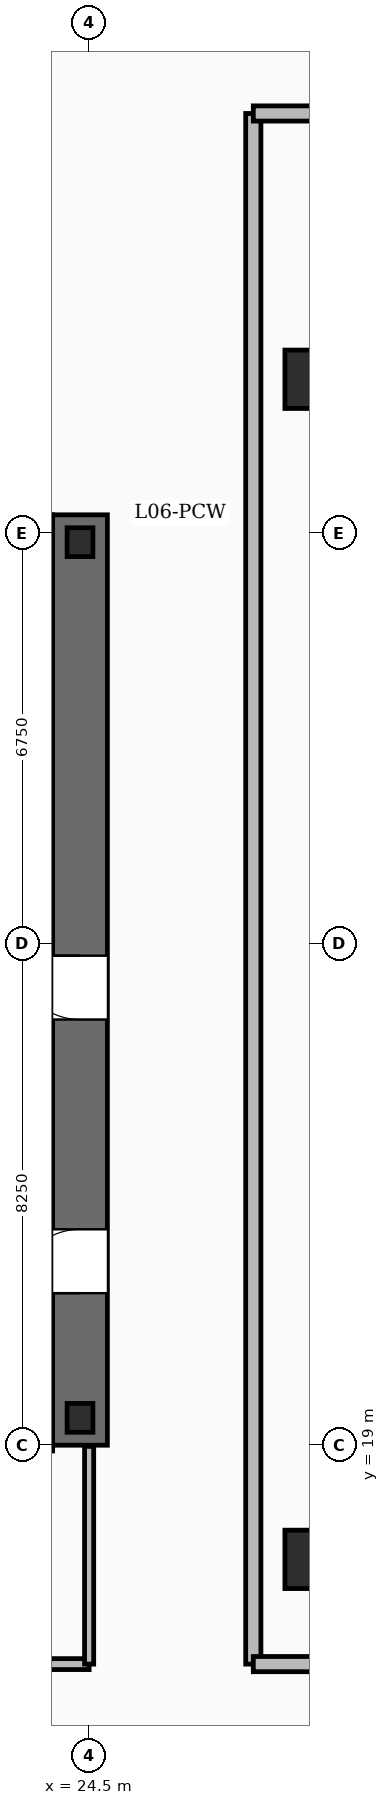
"""IFC4 building model, lengths in metres.
Left out: names, types, materials, properties, quantities, classifications, styles, units other than length and angle.
Written with IfcOpenShell. Run it as: python <this file> out.ifc"""

import sys

from ifc_helpers import new_model, si_unit, direction, frame, frame_2d, origin, origin_2d, place, context, subcontext, project, spatial, rectangle, circle, i_section, extrude, element, fill, save


model = new_model("IFC4")
c1 = context("Model", 3, precision=1e-05, world=origin(), true_north=direction((0.0, 1.0)))
c2 = subcontext(c1, "Body", "Model", "MODEL_VIEW")
j1 = project(units=[si_unit("LENGTHUNIT", "METRE"), si_unit("PLANEANGLEUNIT", "RADIAN")], contexts=[c1])
p1 = place(None, origin())
s1 = spatial("IfcSite", under=j1, at=p1, CompositionType="ELEMENT")
p2 = place(p1, origin())
s2 = spatial("IfcBuilding", under=s1, at=p2, CompositionType="ELEMENT")
p3 = place(p2, frame((0.0, 0.0, 34.0)))
s3 = spatial("IfcBuildingStorey", under=s2, at=p3, CompositionType="ELEMENT", Elevation=34.0)
p4 = place(p3, frame((24.35, 19.0, -0.45), z_axis=(0.0, 0.0, 1.0), x_axis=(0.0, 1.0, 0.0)))
e1 = element("IfcWall", 1, at=p4, inside=s3, PredefinedType="SHEAR", context=c2, shape_type="SweptSolid", body=[
    extrude(rectangle(XDim=15.3, YDim=0.9, at=frame_2d((7.65, 0.0))), origin(), (0.0, 0.0, 1.0), 8.0),
])
p5 = place(p4, frame((2.5, 0.0, 0.45)))
e2 = element("IfcOpeningElement", 2, at=p5, cuts=e1, PredefinedType="OPENING", context=c2, shape_type="SweptSolid", body=[
    extrude(rectangle(XDim=1.05, YDim=2.15, at=frame_2d((0.525, 1.075))), frame((0.0, 0.46, 0.0), z_axis=(0.0, -1.0, 0.0), x_axis=(1.0, 0.0, 0.0)), (0.0, 0.0, 1.0), 0.92),
])
p6 = place(p4, frame((7.0, 0.0, 0.45)))
e3 = element("IfcOpeningElement", 3, at=p6, cuts=e1, PredefinedType="OPENING", context=c2, shape_type="SweptSolid", body=[
    extrude(rectangle(XDim=1.05, YDim=2.15, at=frame_2d((0.525, 1.075))), frame((0.0, 0.46, 0.0), z_axis=(0.0, -1.0, 0.0), x_axis=(1.0, 0.0, 0.0)), (0.0, 0.0, 1.0), 0.92),
])
for number, where, z_axis, x_axis in (
    (4, (15.0, 19.45, -0.45), (0.0, 0.0, 1.0), (1.0, 0.0, 0.0)),
    (5, (15.0, 33.85, -0.45), (0.0, 0.0, 1.0), (1.0, 0.0, 0.0)),
):
    element("IfcWall", number, at=place(p3, frame(where, z_axis=z_axis, x_axis=x_axis)), inside=s3, PredefinedType="SHEAR", context=c2, shape_type="SweptSolid", body=[
        extrude(rectangle(XDim=8.9, YDim=0.9, at=frame_2d((4.45, 0.0))), origin(), (0.0, 0.0, 1.0), 8.0),
    ])
for number, where, z_axis, x_axis in (
    (6, (24.35, 19.45, -0.45), (0.0, 0.0, 1.0), (1.0, 0.0, 0.0)),
    (7, (24.35, 33.85, -0.45), (0.0, 0.0, 1.0), (1.0, 0.0, 0.0)),
):
    element("IfcColumn", number, at=place(p3, frame(where, z_axis=z_axis, x_axis=x_axis)), inside=s3, PredefinedType="COLUMN", context=c2, shape_type="SweptSolid", body=[
        extrude(i_section(OverallWidth=0.424, OverallDepth=0.474, WebThickness=0.048, FlangeThickness=0.077, FilletRadius=0.02, at=origin_2d()), origin(), (0.0, 0.0, 1.0), 8.0),
    ])
p7 = place(p3, frame((28.2, 17.122, -0.189), z_axis=(0.33663196879, 0.279836881196, 0.899094120496), x_axis=(-0.639254025081, 0.768995638101, 0.0)))
e8 = element("IfcColumn", 8, at=p7, inside=s3, PredefinedType="COLUMN", context=c2, shape_type="SweptSolid", body=[
    extrude(circle(Radius=0.48, at=origin_2d()), origin(), (0.0, 0.0, 1.0), 8.318),
])
p8 = place(p3, frame((28.2, 36.529, -0.179), z_axis=(0.333173065494, -0.31873527549, 0.887357612571), x_axis=(0.691277002616, 0.722589859916, 0.0)))
e9 = element("IfcColumn", 9, at=p8, inside=s3, PredefinedType="COLUMN", context=c2, shape_type="SweptSolid", body=[
    extrude(circle(Radius=0.48, at=origin_2d()), origin(), (0.0, 0.0, 1.0), 8.404),
])
p9 = place(p3, frame((23.9, 28.78, 0.0), z_axis=(0.0, 0.0, 1.0), x_axis=(-1.0, 0.0, 0.0)))
e10 = element("IfcWall", 10, at=p9, inside=s3, PredefinedType="SOLIDWALL", context=c2, shape_type="SweptSolid", body=[
    extrude(rectangle(XDim=8.9, YDim=0.24, at=frame_2d((4.45, 0.0))), origin(), (0.0, 0.0, 1.0), 7.55),
])
p10 = place(p9, frame((7.38, 0.0, 0.0)))
e11 = element("IfcOpeningElement", 11, at=p10, cuts=e10, PredefinedType="OPENING", context=c2, shape_type="SweptSolid", body=[
    extrude(rectangle(XDim=1.1, YDim=2.15, at=frame_2d((0.55, 1.075))), frame((0.0, 0.13, 0.0), z_axis=(0.0, -1.0, 0.0), x_axis=(1.0, 0.0, 0.0)), (0.0, 0.0, 1.0), 0.26),
])
p11 = place(p3, frame((15.0, 32.25, 0.0), z_axis=(0.0, 0.0, 1.0), x_axis=(1.0, 0.0, 0.0)))
e12 = element("IfcWall", 12, at=p11, inside=s3, PredefinedType="SOLIDWALL", context=c2, shape_type="SweptSolid", body=[
    extrude(rectangle(XDim=8.9, YDim=0.24, at=frame_2d((4.45, 0.0))), origin(), (0.0, 0.0, 1.0), 7.55),
])
p12 = place(p3, frame((23.78, 28.9, 0.0), z_axis=(0.0, 0.0, 1.0), x_axis=(0.0, 1.0, 0.0)))
e13 = element("IfcWall", 13, at=p12, inside=s3, PredefinedType="SOLIDWALL", context=c2, shape_type="SweptSolid", body=[
    extrude(rectangle(XDim=3.23, YDim=0.24, at=frame_2d((1.615, 0.0))), origin(), (0.0, 0.0, 1.0), 7.55),
])
for number, where, z_axis, x_axis in (
    (14, (20.9, 20.905, 0.0), (0.0, 0.0, 1.0), (1.0, 0.0, 0.0)),
    (15, (20.9, 18.995, 0.0), (0.0, 0.0, 1.0), (1.0, 0.0, 0.0)),
):
    element("IfcWall", number, at=place(p3, frame(where, z_axis=z_axis, x_axis=x_axis)), inside=s3, PredefinedType="SOLIDWALL", context=c2, shape_type="SweptSolid", body=[
        extrude(rectangle(XDim=3.0, YDim=0.18, at=frame_2d((1.5, 0.0))), origin(), (0.0, 0.0, 1.0), 7.55),
    ])
for number, where, z_axis, x_axis in (
    (16, (20.95, 25.155, 0.0), (0.0, 0.0, 1.0), (1.0, 0.0, 0.0)),
    (17, (20.95, 23.045, 0.0), (0.0, 0.0, 1.0), (1.0, 0.0, 0.0)),
):
    element("IfcWall", number, at=place(p3, frame(where, z_axis=z_axis, x_axis=x_axis)), inside=s3, PredefinedType="SOLIDWALL", context=c2, shape_type="SweptSolid", body=[
        extrude(rectangle(XDim=2.95, YDim=0.18, at=frame_2d((1.475, 0.0))), origin(), (0.0, 0.0, 1.0), 7.55),
    ])
p13 = place(p3, frame((14.6, 15.4, 0.0), z_axis=(0.0, 0.0, 1.0), x_axis=(1.0, 0.0, 0.0)))
e18 = element("IfcWall", 18, at=p13, inside=s3, PredefinedType="PARTITIONING", context=c2, shape_type="SweptSolid", body=[
    extrude(rectangle(XDim=9.9, YDim=0.18, at=frame_2d((4.95, 0.0))), origin(), (0.0, 0.0, 1.0), 6.61),
])
p14 = place(p13, frame((0.74, 0.0, 0.0)))
e19 = element("IfcOpeningElement", 19, at=p14, cuts=e18, PredefinedType="OPENING", context=c2, shape_type="SweptSolid", body=[
    extrude(rectangle(XDim=0.92, YDim=2.1, at=frame_2d((0.46, 1.05))), frame((0.0, 0.1, 0.0), z_axis=(0.0, -1.0, 0.0), x_axis=(1.0, 0.0, 0.0)), (0.0, 0.0, 1.0), 0.2),
])
p15 = place(p13, frame((3.19, 0.0, 0.0)))
e20 = element("IfcOpeningElement", 20, at=p15, cuts=e18, PredefinedType="OPENING", context=c2, shape_type="SweptSolid", body=[
    extrude(rectangle(XDim=0.92, YDim=2.1, at=frame_2d((0.46, 1.05))), frame((0.0, 0.1, 0.0), z_axis=(0.0, -1.0, 0.0), x_axis=(1.0, 0.0, 0.0)), (0.0, 0.0, 1.0), 0.2),
])
p16 = place(p13, frame((5.69, 0.0, 0.0)))
e21 = element("IfcOpeningElement", 21, at=p16, cuts=e18, PredefinedType="OPENING", context=c2, shape_type="SweptSolid", body=[
    extrude(rectangle(XDim=0.92, YDim=2.1, at=frame_2d((0.46, 1.05))), frame((0.0, 0.1, 0.0), z_axis=(0.0, -1.0, 0.0), x_axis=(1.0, 0.0, 0.0)), (0.0, 0.0, 1.0), 0.2),
])
p17 = place(p13, frame((8.19, 0.0, 0.0)))
e22 = element("IfcOpeningElement", 22, at=p17, cuts=e18, PredefinedType="OPENING", context=c2, shape_type="SweptSolid", body=[
    extrude(rectangle(XDim=0.92, YDim=2.1, at=frame_2d((0.46, 1.05))), frame((0.0, 0.1, 0.0), z_axis=(0.0, -1.0, 0.0), x_axis=(1.0, 0.0, 0.0)), (0.0, 0.0, 1.0), 0.2),
])
p18 = place(p3, frame((24.5, 15.4, 0.0), z_axis=(0.0, 0.0, 1.0), x_axis=(0.0, 1.0, 0.0)))
e23 = element("IfcWall", 23, at=p18, inside=s3, PredefinedType="PARTITIONING", context=c2, shape_type="SweptSolid", body=[
    extrude(rectangle(XDim=3.58, YDim=0.15, at=frame_2d((1.79, 0.0))), origin(), (0.0, 0.0, 1.0), 5.6),
])
for number, where, z_axis, x_axis in (
    (24, (27.2, 15.4, 0.0), (0.0, 0.0, 1.0), (1.0, 0.0, 0.0)),
    (25, (27.2, 40.9, 0.0), (0.0, 0.0, 1.0), (1.0, 0.0, 0.0)),
):
    element("IfcWall", number, at=place(p3, frame(where, z_axis=z_axis, x_axis=x_axis)), inside=s3, PredefinedType="SOLIDWALL", context=c2, shape_type="SweptSolid", body=[
        extrude(rectangle(XDim=20.5, YDim=0.25, at=frame_2d((10.25, 0.0))), origin(), (0.0, 0.0, 1.0), 6.61),
    ])
p19 = place(p3, frame((27.2, 15.4, 0.0), z_axis=(0.0, 0.0, 1.0), x_axis=(0.0, 1.0, 0.0)))
e26 = element("IfcWall", 26, at=p19, inside=s3, PredefinedType="SOLIDWALL", context=c2, shape_type="SweptSolid", body=[
    extrude(rectangle(XDim=25.5, YDim=0.25, at=frame_2d((12.75, 0.0))), origin(), (0.0, 0.0, 1.0), 6.61),
])
p20 = place(p5, origin())
e27 = element("IfcDoor", 27, at=p20, inside=s3, OperationType="SINGLE_SWING_LEFT", PredefinedType="DOOR", context=c2, shape_type="SweptSolid", body=[
    extrude(rectangle(XDim=1.05, YDim=2.15, at=frame_2d((0.525, 1.075))), frame((0.0, 0.025, 0.0), z_axis=(0.0, -1.0, 0.0), x_axis=(1.0, 0.0, 0.0)), (0.0, 0.0, 1.0), 0.05),
])
fill(e2, e27)
p21 = place(p6, origin())
e28 = element("IfcDoor", 28, at=p21, inside=s3, OperationType="SINGLE_SWING_RIGHT", PredefinedType="DOOR", context=c2, shape_type="SweptSolid", body=[
    extrude(rectangle(XDim=1.05, YDim=2.15, at=frame_2d((0.525, 1.075))), frame((0.0, 0.025, 0.0), z_axis=(0.0, -1.0, 0.0), x_axis=(1.0, 0.0, 0.0)), (0.0, 0.0, 1.0), 0.05),
])
fill(e3, e28)
save(model, sys.argv[1])
